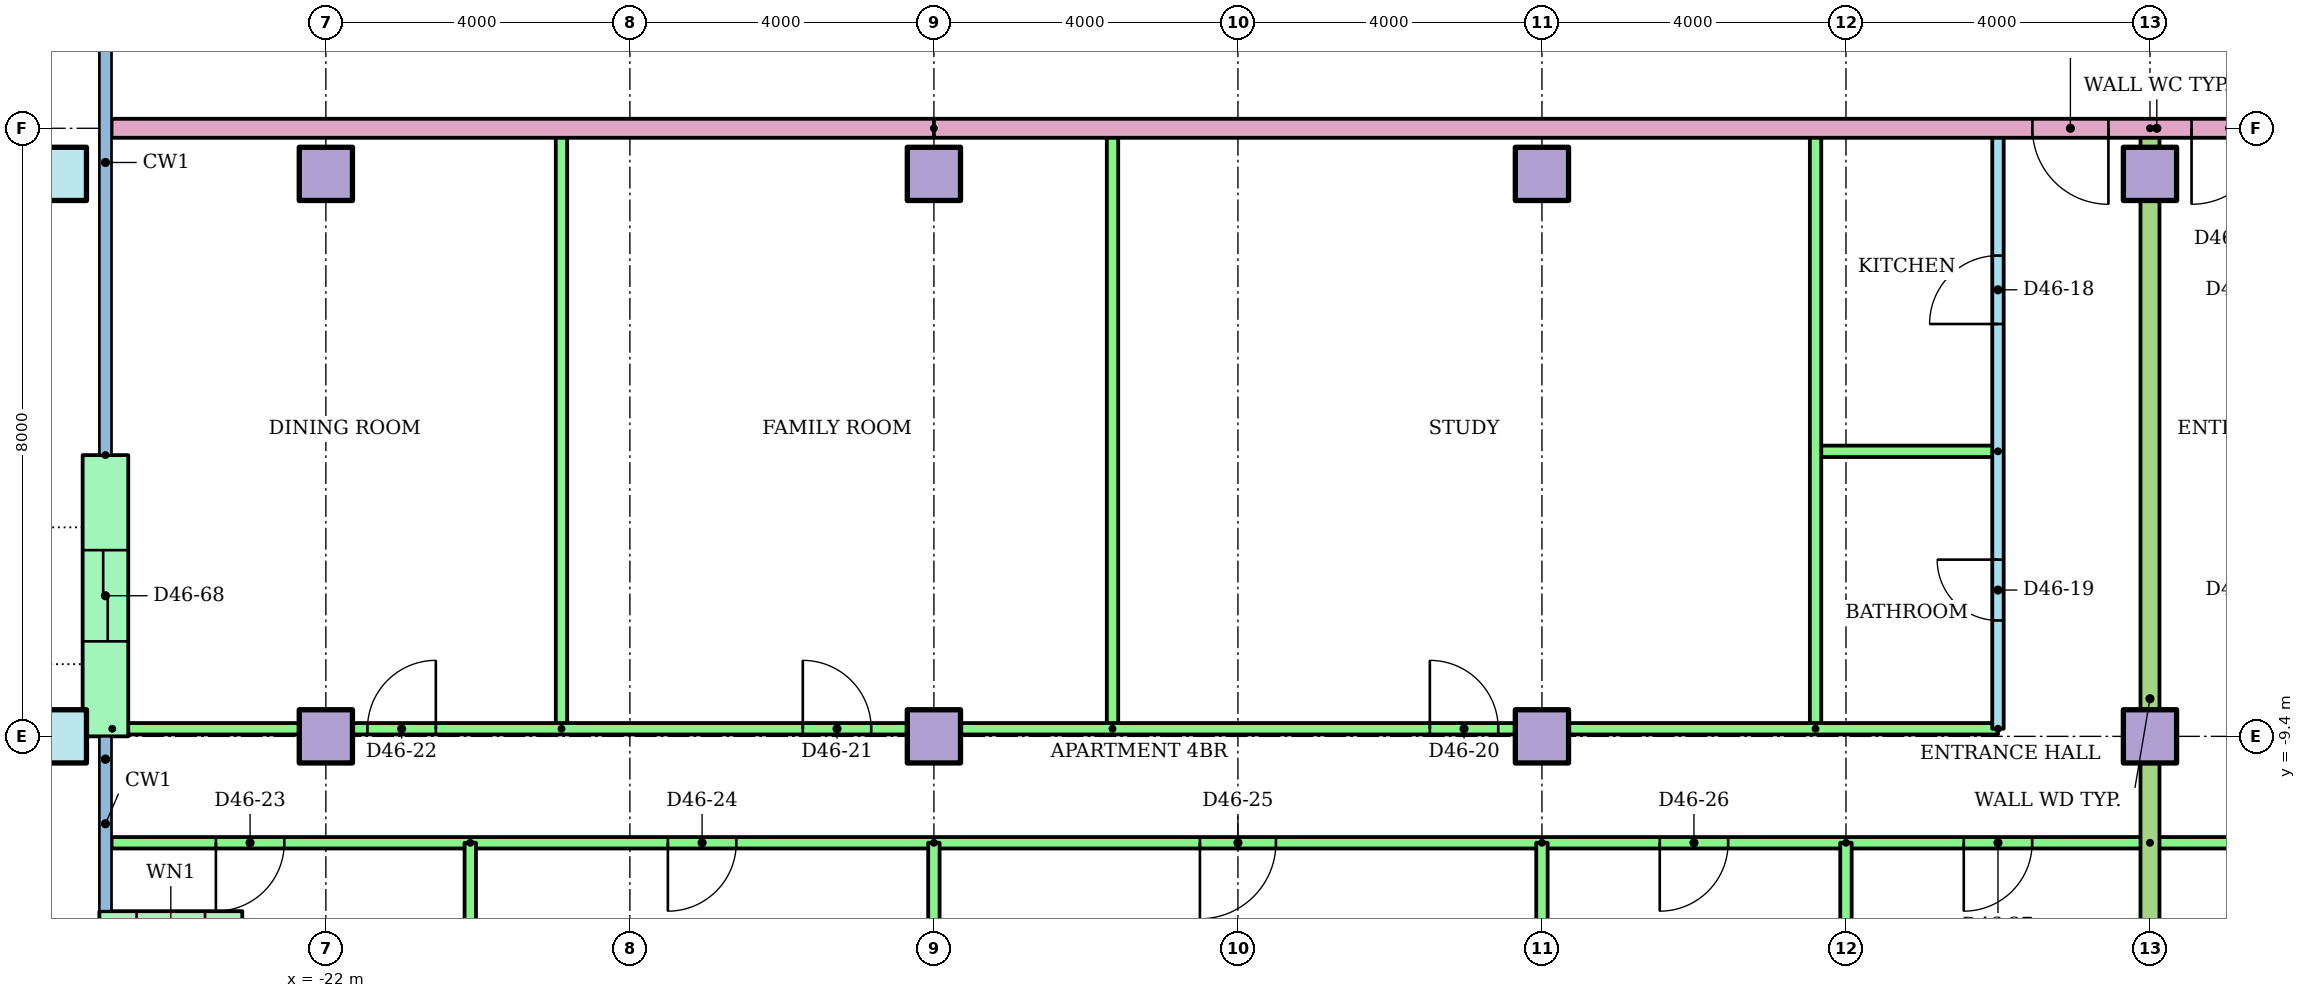
"""IFC4 building model, lengths in metres.
Left out: names, types, materials, properties, quantities, classifications, styles, units other than length and angle.
Written with IfcOpenShell. Run it as: python <this file> out.ifc"""

import sys

from ifc_helpers import new_model, si_unit, direction, frame, frame_2d, origin, origin_2d, place, context, subcontext, project, spatial, rectangle, hollow_rectangle, extrude, element, fill, save


model = new_model("IFC4")
c1 = context("Model", 3, precision=1e-05, world=origin(), true_north=direction((0.0, 1.0)))
c2 = subcontext(c1, "Body", "Model", "MODEL_VIEW")
j1 = project(units=[si_unit("LENGTHUNIT", "METRE"), si_unit("PLANEANGLEUNIT", "RADIAN")], contexts=[c1])
p1 = place(None, origin())
s1 = spatial("IfcSite", under=j1, at=p1, CompositionType="ELEMENT")
p2 = place(p1, origin())
s2 = spatial("IfcBuilding", under=s1, at=p2, CompositionType="ELEMENT")
p3 = place(p2, frame((0.0, 0.0, 178.1)))
s3 = spatial("IfcBuildingStorey", under=s2, at=p3, CompositionType="ELEMENT", Elevation=178.1)
p4 = place(p3, frame((-25.5, -9.4, 0.0)))
e1 = element("IfcColumn", 1, at=p4, inside=s3, PredefinedType="COLUMN", context=c2, shape_type="SweptSolid", body=[
    extrude(hollow_rectangle(XDim=0.7, YDim=0.7, WallThickness=0.036, at=origin_2d()), origin(), (0.0, 0.0, 1.0), 3.2),
])
for number, where in (
    (2, (-22.0, -9.4, 0.0)),
    (3, (-14.0, -9.4, 0.0)),
    (4, (-6.0, -9.4, 0.0)),
    (5, (2.0, -9.4, 0.0)),
):
    element("IfcColumn", number, at=place(p3, frame(where)), inside=s3, PredefinedType="COLUMN", context=c2, shape_type="SweptSolid", body=[
        extrude(rectangle(XDim=0.7, YDim=0.7, at=origin_2d()), origin(), (0.0, 0.0, 1.0), 3.2),
    ])
p5 = place(p3, frame((-25.5, -2.0, 0.0)))
e6 = element("IfcColumn", 6, at=p5, inside=s3, PredefinedType="COLUMN", context=c2, shape_type="SweptSolid", body=[
    extrude(hollow_rectangle(XDim=0.7, YDim=0.7, WallThickness=0.036, at=origin_2d()), origin(), (0.0, 0.0, 1.0), 3.2),
])
for number, where in (
    (7, (-22.0, -2.0, 0.0)),
    (8, (-14.0, -2.0, 0.0)),
    (9, (-6.0, -2.0, 0.0)),
    (10, (2.0, -2.0, 0.0)),
):
    element("IfcColumn", number, at=place(p3, frame(where)), inside=s3, PredefinedType="COLUMN", context=c2, shape_type="SweptSolid", body=[
        extrude(rectangle(XDim=0.7, YDim=0.7, at=origin_2d()), origin(), (0.0, 0.0, 1.0), 3.2),
    ])
p6 = place(p3, frame((-24.9, -5.7, 0.0), z_axis=(0.0, 0.0, 1.0), x_axis=(0.0, -1.0, 0.0)))
e11 = element("IfcWall", 11, at=p6, inside=s3, PredefinedType="STANDARD", context=c2, shape_type="SweptSolid", body=[
    extrude(rectangle(XDim=3.7, YDim=0.6, at=frame_2d((1.85, 0.0))), origin(), (0.0, 0.0, 1.0), 2.92),
])
p7 = place(p6, frame((1.25, 0.0, 0.0)))
e12 = element("IfcOpeningElement", 12, at=p7, cuts=e11, PredefinedType="OPENING", context=c2, shape_type="SweptSolid", body=[
    extrude(rectangle(XDim=1.2, YDim=2.1, at=frame_2d((0.6, 1.05))), frame((0.0, 0.31, 0.0), z_axis=(0.0, -1.0, 0.0), x_axis=(1.0, 0.0, 0.0)), (0.0, 0.0, 1.0), 0.62),
])
p8 = place(p3, frame((-24.98, -12.0, 0.0)))
e13 = element("IfcWall", 13, at=p8, inside=s3, PredefinedType="STANDARD", context=c2, shape_type="SweptSolid", body=[
    extrude(rectangle(XDim=1.88, YDim=0.6, at=frame_2d((0.94, 0.0))), origin(), (0.0, 0.0, 1.0), 2.92),
])
p9 = place(p8, frame((0.49, 0.0, 0.9)))
e14 = element("IfcOpeningElement", 14, at=p9, cuts=e13, PredefinedType="OPENING", context=c2, shape_type="SweptSolid", body=[
    extrude(rectangle(XDim=0.9, YDim=1.5, at=frame_2d((0.45, 0.75))), frame((0.0, 0.31, 0.0), z_axis=(0.0, -1.0, 0.0), x_axis=(1.0, 0.0, 0.0)), (0.0, 0.0, 1.0), 0.62),
])
p10 = place(p3, frame((0.0, -9.3, 0.0), z_axis=(0.0, 0.0, 1.0), x_axis=(0.0, 1.0, 0.0)))
e15 = element("IfcWall", 15, at=p10, inside=s3, PredefinedType="PARTITIONING", context=c2, shape_type="SweptSolid", body=[
    extrude(rectangle(XDim=7.9, YDim=0.15, at=frame_2d((3.95, 0.0))), origin(), (0.0, 0.0, 1.0), 2.4),
])
p11 = place(p10, frame((5.325, 0.0, 0.0)))
e16 = element("IfcOpeningElement", 16, at=p11, cuts=e15, PredefinedType="OPENING", context=c2, shape_type="SweptSolid", body=[
    extrude(rectangle(XDim=0.9, YDim=2.1, at=frame_2d((0.45, 1.05))), frame((0.0, 0.085, 0.0), z_axis=(0.0, -1.0, 0.0), x_axis=(1.0, 0.0, 0.0)), (0.0, 0.0, 1.0), 0.17),
])
p12 = place(p10, frame((1.425, 0.0, 0.0)))
e17 = element("IfcOpeningElement", 17, at=p12, cuts=e15, PredefinedType="OPENING", context=c2, shape_type="SweptSolid", body=[
    extrude(rectangle(XDim=0.8, YDim=2.1, at=frame_2d((0.4, 1.05))), frame((0.0, 0.085, 0.0), z_axis=(0.0, -1.0, 0.0), x_axis=(1.0, 0.0, 0.0)), (0.0, 0.0, 1.0), 0.17),
])
p13 = place(p3, frame((0.0, -5.65, 0.0), z_axis=(0.0, 0.0, 1.0), x_axis=(-1.0, 0.0, 0.0)))
e18 = element("IfcWall", 18, at=p13, inside=s3, PredefinedType="PARTITIONING", context=c2, shape_type="SweptSolid", body=[
    extrude(rectangle(XDim=2.4, YDim=0.15, at=frame_2d((1.2, 0.0))), origin(), (0.0, 0.0, 1.0), 2.4),
])
for number, where, z_axis, x_axis in (
    (19, (-2.4, -9.3, 0.0), (0.0, 0.0, 1.0), (0.0, 1.0, 0.0)),
    (20, (-11.65, -9.3, 0.0), (0.0, 0.0, 1.0), (0.0, 1.0, 0.0)),
    (21, (-18.9, -9.3, 0.0), (0.0, 0.0, 1.0), (0.0, 1.0, 0.0)),
):
    element("IfcWall", number, at=place(p3, frame(where, z_axis=z_axis, x_axis=x_axis)), inside=s3, PredefinedType="PARTITIONING", context=c2, shape_type="SweptSolid", body=[
        extrude(rectangle(XDim=7.9, YDim=0.15, at=frame_2d((3.95, 0.0))), origin(), (0.0, 0.0, 1.0), 2.4),
    ])
p14 = place(p3, frame((-24.81, -9.3, 0.0)))
e22 = element("IfcWall", 22, at=p14, inside=s3, PredefinedType="PARTITIONING", context=c2, shape_type="SweptSolid", body=[
    extrude(rectangle(XDim=24.81, YDim=0.15, at=frame_2d((12.405, 0.0))), origin(), (0.0, 0.0, 1.0), 2.4),
])
p15 = place(p14, frame((17.335, 0.0, 0.0)))
e23 = element("IfcOpeningElement", 23, at=p15, cuts=e22, PredefinedType="OPENING", context=c2, shape_type="SweptSolid", body=[
    extrude(rectangle(XDim=0.9, YDim=2.1, at=frame_2d((0.45, 1.05))), frame((0.0, 0.085, 0.0), z_axis=(0.0, -1.0, 0.0), x_axis=(1.0, 0.0, 0.0)), (0.0, 0.0, 1.0), 0.17),
])
p16 = place(p14, frame((9.085, 0.0, 0.0)))
e24 = element("IfcOpeningElement", 24, at=p16, cuts=e22, PredefinedType="OPENING", context=c2, shape_type="SweptSolid", body=[
    extrude(rectangle(XDim=0.9, YDim=2.1, at=frame_2d((0.45, 1.05))), frame((0.0, 0.085, 0.0), z_axis=(0.0, -1.0, 0.0), x_axis=(1.0, 0.0, 0.0)), (0.0, 0.0, 1.0), 0.17),
])
p17 = place(p14, frame((3.357, 0.0, 0.0)))
e25 = element("IfcOpeningElement", 25, at=p17, cuts=e22, PredefinedType="OPENING", context=c2, shape_type="SweptSolid", body=[
    extrude(rectangle(XDim=0.9, YDim=2.1, at=frame_2d((0.45, 1.05))), frame((0.0, 0.085, 0.0), z_axis=(0.0, -1.0, 0.0), x_axis=(1.0, 0.0, 0.0)), (0.0, 0.0, 1.0), 0.17),
])
p18 = place(p3, frame((2.0, -10.8, 0.0), z_axis=(0.0, 0.0, 1.0), x_axis=(-1.0, 0.0, 0.0)))
e26 = element("IfcWall", 26, at=p18, inside=s3, PredefinedType="PARTITIONING", context=c2, shape_type="SweptSolid", body=[
    extrude(rectangle(XDim=26.82, YDim=0.15, at=frame_2d((13.41, 0.0))), origin(), (0.0, 0.0, 1.0), 2.4),
])
p19 = place(p18, frame((24.547, 0.0, 0.0)))
e27 = element("IfcOpeningElement", 27, at=p19, cuts=e26, PredefinedType="OPENING", context=c2, shape_type="SweptSolid", body=[
    extrude(rectangle(XDim=0.9, YDim=2.1, at=frame_2d((0.45, 1.05))), frame((0.0, 0.085, 0.0), z_axis=(0.0, -1.0, 0.0), x_axis=(1.0, 0.0, 0.0)), (0.0, 0.0, 1.0), 0.17),
])
p20 = place(p18, frame((18.6, 0.0, 0.0)))
e28 = element("IfcOpeningElement", 28, at=p20, cuts=e26, PredefinedType="OPENING", context=c2, shape_type="SweptSolid", body=[
    extrude(rectangle(XDim=0.9, YDim=2.1, at=frame_2d((0.45, 1.05))), frame((0.0, 0.085, 0.0), z_axis=(0.0, -1.0, 0.0), x_axis=(1.0, 0.0, 0.0)), (0.0, 0.0, 1.0), 0.17),
])
p21 = place(p18, frame((11.5, 0.0, 0.0)))
e29 = element("IfcOpeningElement", 29, at=p21, cuts=e26, PredefinedType="OPENING", context=c2, shape_type="SweptSolid", body=[
    extrude(rectangle(XDim=1.0, YDim=2.1, at=frame_2d((0.5, 1.05))), frame((0.0, 0.085, 0.0), z_axis=(0.0, -1.0, 0.0), x_axis=(1.0, 0.0, 0.0)), (0.0, 0.0, 1.0), 0.17),
])
p22 = place(p18, frame((5.55, 0.0, 0.0)))
e30 = element("IfcOpeningElement", 30, at=p22, cuts=e26, PredefinedType="OPENING", context=c2, shape_type="SweptSolid", body=[
    extrude(rectangle(XDim=0.9, YDim=2.1, at=frame_2d((0.45, 1.05))), frame((0.0, 0.085, 0.0), z_axis=(0.0, -1.0, 0.0), x_axis=(1.0, 0.0, 0.0)), (0.0, 0.0, 1.0), 0.17),
])
p23 = place(p18, frame((1.55, 0.0, 0.0)))
e31 = element("IfcOpeningElement", 31, at=p23, cuts=e26, PredefinedType="OPENING", context=c2, shape_type="SweptSolid", body=[
    extrude(rectangle(XDim=0.9, YDim=2.1, at=frame_2d((0.45, 1.05))), frame((0.0, 0.085, 0.0), z_axis=(0.0, -1.0, 0.0), x_axis=(1.0, 0.0, 0.0)), (0.0, 0.0, 1.0), 0.17),
])
p24 = place(p3, frame((-20.1, -10.8, 0.0), z_axis=(0.0, 0.0, 1.0), x_axis=(0.0, -1.0, 0.0)))
e32 = element("IfcWall", 32, at=p24, inside=s3, PredefinedType="PARTITIONING", context=c2, shape_type="SweptSolid", body=[
    extrude(rectangle(XDim=3.82, YDim=0.15, at=frame_2d((1.91, 0.0))), origin(), (0.0, 0.0, 1.0), 2.4),
])
for number, where, z_axis, x_axis in (
    (33, (-14.0, -10.8, 0.0), (0.0, 0.0, 1.0), (0.0, -1.0, 0.0)),
    (34, (-6.0, -10.8, 0.0), (0.0, 0.0, 1.0), (0.0, -1.0, 0.0)),
):
    element("IfcWall", number, at=place(p3, frame(where, z_axis=z_axis, x_axis=x_axis)), inside=s3, PredefinedType="PARTITIONING", context=c2, shape_type="SweptSolid", body=[
        extrude(rectangle(XDim=5.61, YDim=0.15, at=frame_2d((2.805, 0.0))), origin(), (0.0, 0.0, 1.0), 2.4),
    ])
p25 = place(p3, frame((-2.0, -10.8, 0.0), z_axis=(0.0, 0.0, 1.0), x_axis=(0.0, -1.0, 0.0)))
e35 = element("IfcWall", 35, at=p25, inside=s3, PredefinedType="PARTITIONING", context=c2, shape_type="SweptSolid", body=[
    extrude(rectangle(XDim=5.621, YDim=0.15, at=frame_2d((2.811, 0.0))), origin(), (0.0, 0.0, 1.0), 2.4),
])
p26 = place(p3, frame((18.0, -10.8, 0.0), z_axis=(0.0, 0.0, 1.0), x_axis=(-1.0, 0.0, 0.0)))
e36 = element("IfcWall", 36, at=p26, inside=s3, PredefinedType="PARTITIONING", context=c2, shape_type="SweptSolid", body=[
    extrude(rectangle(XDim=16.0, YDim=0.15, at=frame_2d((8.0, 0.0))), origin(), (0.0, 0.0, 1.0), 2.4),
])
p27 = place(p26, frame((11.5, 0.0, 0.0)))
e37 = element("IfcOpeningElement", 37, at=p27, cuts=e36, PredefinedType="OPENING", context=c2, shape_type="SweptSolid", body=[
    extrude(rectangle(XDim=1.0, YDim=2.1, at=frame_2d((0.5, 1.05))), frame((0.0, 0.085, 0.0), z_axis=(0.0, -1.0, 0.0), x_axis=(1.0, 0.0, 0.0)), (0.0, 0.0, 1.0), 0.17),
])
p28 = place(p26, frame((5.55, 0.0, 0.0)))
e38 = element("IfcOpeningElement", 38, at=p28, cuts=e36, PredefinedType="OPENING", context=c2, shape_type="SweptSolid", body=[
    extrude(rectangle(XDim=0.9, YDim=2.1, at=frame_2d((0.45, 1.05))), frame((0.0, 0.085, 0.0), z_axis=(0.0, -1.0, 0.0), x_axis=(1.0, 0.0, 0.0)), (0.0, 0.0, 1.0), 0.17),
])
p29 = place(p26, frame((1.55, 0.0, 0.0)))
e39 = element("IfcOpeningElement", 39, at=p29, cuts=e36, PredefinedType="OPENING", context=c2, shape_type="SweptSolid", body=[
    extrude(rectangle(XDim=0.9, YDim=2.1, at=frame_2d((0.45, 1.05))), frame((0.0, 0.085, 0.0), z_axis=(0.0, -1.0, 0.0), x_axis=(1.0, 0.0, 0.0)), (0.0, 0.0, 1.0), 0.17),
])
p30 = place(p3, frame((2.0, -1.4, 0.0), z_axis=(0.0, 0.0, 1.0), x_axis=(0.0, -1.0, 0.0)))
e40 = element("IfcWall", 40, at=p30, inside=s3, PredefinedType="PARTITIONING", context=c2, shape_type="SweptSolid", body=[
    extrude(rectangle(XDim=15.01, YDim=0.25, at=frame_2d((7.505, 0.0))), origin(), (0.0, 0.0, 1.0), 2.4),
])
p31 = place(p3, frame((-14.0, -1.4, 0.0), z_axis=(0.0, 0.0, 1.0), x_axis=(-1.0, 0.0, 0.0)))
e41 = element("IfcWall", 41, at=p31, inside=s3, PredefinedType="PARTITIONING", context=c2, shape_type="SweptSolid", body=[
    extrude(rectangle(XDim=10.82, YDim=0.25, at=frame_2d((5.41, 0.0))), origin(), (0.0, 0.0, 1.0), 2.4),
])
p32 = place(p3, frame((14.0, -1.4, 0.0), z_axis=(0.0, 0.0, 1.0), x_axis=(-1.0, 0.0, 0.0)))
e42 = element("IfcWall", 42, at=p32, inside=s3, PredefinedType="PARTITIONING", context=c2, shape_type="SweptSolid", body=[
    extrude(rectangle(XDim=28.0, YDim=0.25, at=frame_2d((14.0, 0.0))), origin(), (0.0, 0.0, 1.0), 2.4),
])
p33 = place(p32, frame((12.547, 0.0, 0.0)))
e43 = element("IfcOpeningElement", 43, at=p33, cuts=e42, PredefinedType="OPENING", context=c2, shape_type="SweptSolid", body=[
    extrude(rectangle(XDim=1.0, YDim=2.1, at=frame_2d((0.5, 1.05))), frame((0.0, 0.135, 0.0), z_axis=(0.0, -1.0, 0.0), x_axis=(1.0, 0.0, 0.0)), (0.0, 0.0, 1.0), 0.27),
])
p34 = place(p32, frame((10.453, 0.0, 0.0)))
e44 = element("IfcOpeningElement", 44, at=p34, cuts=e42, PredefinedType="OPENING", context=c2, shape_type="SweptSolid", body=[
    extrude(rectangle(XDim=1.0, YDim=2.1, at=frame_2d((0.5, 1.05))), frame((0.0, 0.135, 0.0), z_axis=(0.0, -1.0, 0.0), x_axis=(1.0, 0.0, 0.0)), (0.0, 0.0, 1.0), 0.27),
])
p35 = place(p11, origin())
e45 = element("IfcDoor", 45, at=p35, inside=s3, OperationType="SINGLE_SWING_LEFT", PredefinedType="DOOR", context=c2, shape_type="SweptSolid", body=[
    extrude(rectangle(XDim=0.9, YDim=2.1, at=frame_2d((0.45, 1.05))), frame((0.0, 0.025, 0.0), z_axis=(0.0, -1.0, 0.0), x_axis=(1.0, 0.0, 0.0)), (0.0, 0.0, 1.0), 0.05),
])
fill(e16, e45)
p36 = place(p12, origin())
e46 = element("IfcDoor", 46, at=p36, inside=s3, OperationType="SINGLE_SWING_RIGHT", PredefinedType="DOOR", context=c2, shape_type="SweptSolid", body=[
    extrude(rectangle(XDim=0.8, YDim=2.1, at=frame_2d((0.4, 1.05))), frame((0.0, 0.025, 0.0), z_axis=(0.0, -1.0, 0.0), x_axis=(1.0, 0.0, 0.0)), (0.0, 0.0, 1.0), 0.05),
])
fill(e17, e46)
p37 = place(p15, origin())
e47 = element("IfcDoor", 47, at=p37, inside=s3, OperationType="SINGLE_SWING_LEFT", PredefinedType="DOOR", context=c2, shape_type="SweptSolid", body=[
    extrude(rectangle(XDim=0.9, YDim=2.1, at=frame_2d((0.45, 1.05))), frame((0.0, 0.025, 0.0), z_axis=(0.0, -1.0, 0.0), x_axis=(1.0, 0.0, 0.0)), (0.0, 0.0, 1.0), 0.05),
])
fill(e23, e47)
p38 = place(p16, origin())
e48 = element("IfcDoor", 48, at=p38, inside=s3, OperationType="SINGLE_SWING_LEFT", PredefinedType="DOOR", context=c2, shape_type="SweptSolid", body=[
    extrude(rectangle(XDim=0.9, YDim=2.1, at=frame_2d((0.45, 1.05))), frame((0.0, 0.025, 0.0), z_axis=(0.0, -1.0, 0.0), x_axis=(1.0, 0.0, 0.0)), (0.0, 0.0, 1.0), 0.05),
])
fill(e24, e48)
p39 = place(p17, origin())
e49 = element("IfcDoor", 49, at=p39, inside=s3, OperationType="SINGLE_SWING_RIGHT", PredefinedType="DOOR", context=c2, shape_type="SweptSolid", body=[
    extrude(rectangle(XDim=0.9, YDim=2.1, at=frame_2d((0.45, 1.05))), frame((0.0, 0.025, 0.0), z_axis=(0.0, -1.0, 0.0), x_axis=(1.0, 0.0, 0.0)), (0.0, 0.0, 1.0), 0.05),
])
fill(e25, e49)
p40 = place(p19, origin())
e50 = element("IfcDoor", 50, at=p40, inside=s3, OperationType="SINGLE_SWING_RIGHT", PredefinedType="DOOR", context=c2, shape_type="SweptSolid", body=[
    extrude(rectangle(XDim=0.9, YDim=2.1, at=frame_2d((0.45, 1.05))), frame((0.0, 0.025, 0.0), z_axis=(0.0, -1.0, 0.0), x_axis=(1.0, 0.0, 0.0)), (0.0, 0.0, 1.0), 0.05),
])
fill(e27, e50)
p41 = place(p20, origin())
e51 = element("IfcDoor", 51, at=p41, inside=s3, OperationType="SINGLE_SWING_RIGHT", PredefinedType="DOOR", context=c2, shape_type="SweptSolid", body=[
    extrude(rectangle(XDim=0.9, YDim=2.1, at=frame_2d((0.45, 1.05))), frame((0.0, 0.025, 0.0), z_axis=(0.0, -1.0, 0.0), x_axis=(1.0, 0.0, 0.0)), (0.0, 0.0, 1.0), 0.05),
])
fill(e28, e51)
p42 = place(p21, origin())
e52 = element("IfcDoor", 52, at=p42, inside=s3, OperationType="SINGLE_SWING_RIGHT", PredefinedType="DOOR", context=c2, shape_type="SweptSolid", body=[
    extrude(rectangle(XDim=1.0, YDim=2.1, at=frame_2d((0.5, 1.05))), frame((0.0, 0.025, 0.0), z_axis=(0.0, -1.0, 0.0), x_axis=(1.0, 0.0, 0.0)), (0.0, 0.0, 1.0), 0.05),
])
fill(e29, e52)
p43 = place(p22, origin())
e53 = element("IfcDoor", 53, at=p43, inside=s3, OperationType="SINGLE_SWING_RIGHT", PredefinedType="DOOR", context=c2, shape_type="SweptSolid", body=[
    extrude(rectangle(XDim=0.9, YDim=2.1, at=frame_2d((0.45, 1.05))), frame((0.0, 0.025, 0.0), z_axis=(0.0, -1.0, 0.0), x_axis=(1.0, 0.0, 0.0)), (0.0, 0.0, 1.0), 0.05),
])
fill(e30, e53)
p44 = place(p23, origin())
e54 = element("IfcDoor", 54, at=p44, inside=s3, OperationType="SINGLE_SWING_RIGHT", PredefinedType="DOOR", context=c2, shape_type="SweptSolid", body=[
    extrude(rectangle(XDim=0.9, YDim=2.1, at=frame_2d((0.45, 1.05))), frame((0.0, 0.025, 0.0), z_axis=(0.0, -1.0, 0.0), x_axis=(1.0, 0.0, 0.0)), (0.0, 0.0, 1.0), 0.05),
])
fill(e31, e54)
p45 = place(p33, origin())
e55 = element("IfcDoor", 55, at=p45, inside=s3, OperationType="SINGLE_SWING_LEFT", PredefinedType="DOOR", context=c2, shape_type="SweptSolid", body=[
    extrude(rectangle(XDim=1.0, YDim=2.1, at=frame_2d((0.5, 1.05))), frame((0.0, 0.025, 0.0), z_axis=(0.0, -1.0, 0.0), x_axis=(1.0, 0.0, 0.0)), (0.0, 0.0, 1.0), 0.05),
])
fill(e43, e55)
p46 = place(p34, origin())
e56 = element("IfcDoor", 56, at=p46, inside=s3, OperationType="SINGLE_SWING_RIGHT", PredefinedType="DOOR", context=c2, shape_type="SweptSolid", body=[
    extrude(rectangle(XDim=1.0, YDim=2.1, at=frame_2d((0.5, 1.05))), frame((0.0, 0.025, 0.0), z_axis=(0.0, -1.0, 0.0), x_axis=(1.0, 0.0, 0.0)), (0.0, 0.0, 1.0), 0.05),
])
fill(e44, e56)
p47 = place(p7, origin())
e57 = element("IfcDoor", 57, at=p47, inside=s3, OperationType="SLIDING_TO_LEFT", PredefinedType="DOOR", context=c2, shape_type="SweptSolid", body=[
    extrude(rectangle(XDim=1.2, YDim=2.1, at=frame_2d((0.6, 1.05))), frame((0.0, 0.025, 0.0), z_axis=(0.0, -1.0, 0.0), x_axis=(1.0, 0.0, 0.0)), (0.0, 0.0, 1.0), 0.05),
])
fill(e12, e57)
save(model, sys.argv[1])
